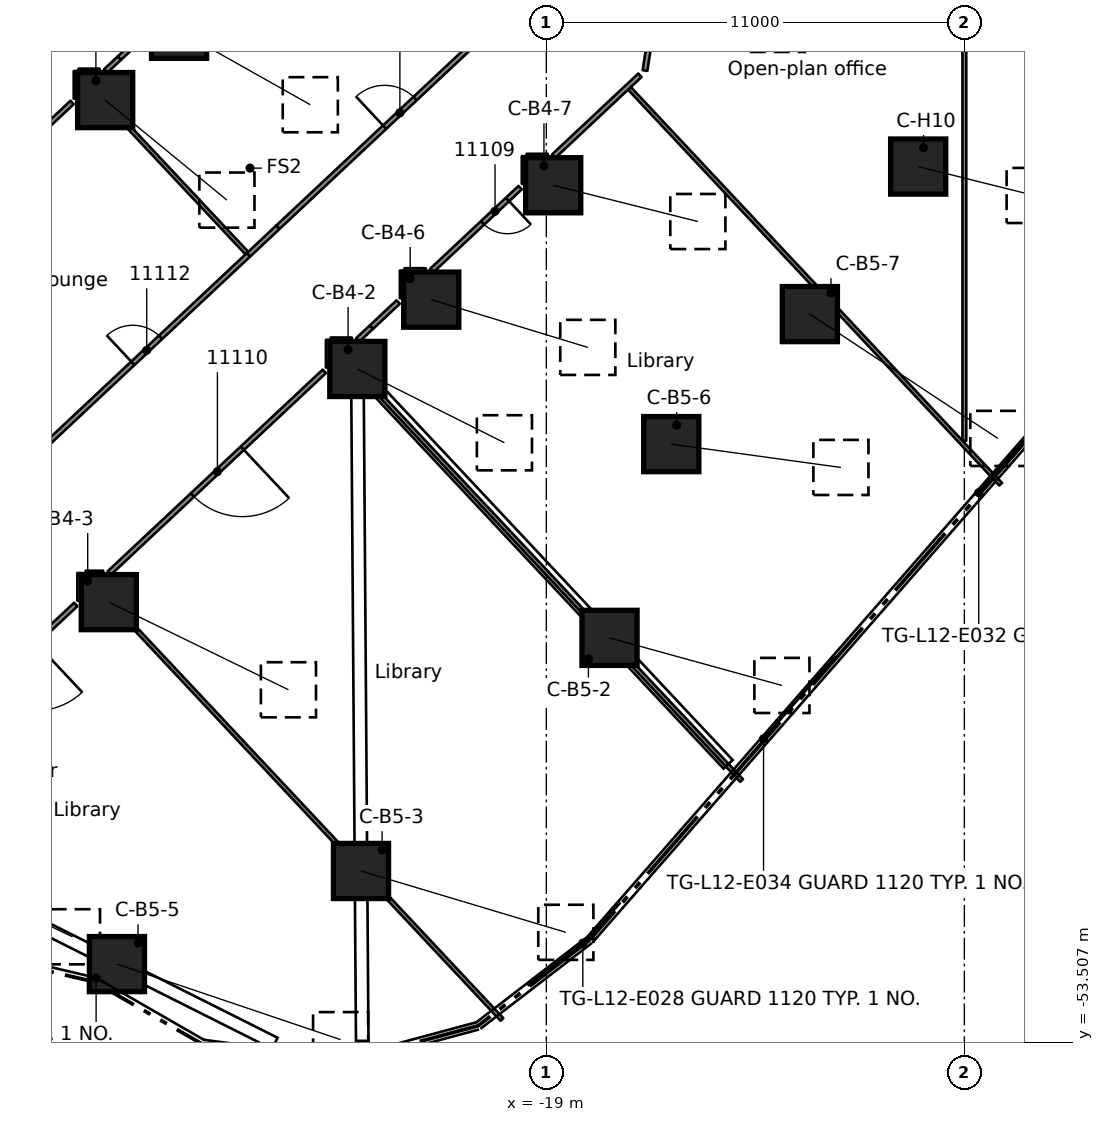
"""IFC4 building model, lengths in metres.
Left out: names, types, materials, properties, quantities, classifications, styles, units other than length and angle.
Written with IfcOpenShell. Run it as: python <this file> out.ifc"""

import sys

from ifc_helpers import new_model, si_unit, direction, frame, frame_2d, origin, origin_2d, place, context, subcontext, project, spatial, rectangle, extrude, element, fill, save


model = new_model("IFC4")
c1 = context("Model", 3, precision=1e-05, world=origin(), true_north=direction((0.0, 1.0)))
c2 = subcontext(c1, "Body", "Model", "MODEL_VIEW")
j1 = project(units=[si_unit("LENGTHUNIT", "METRE"), si_unit("PLANEANGLEUNIT", "RADIAN")], contexts=[c1])
p1 = place(None, origin())
s1 = spatial("IfcSite", under=j1, at=p1, CompositionType="ELEMENT")
p2 = place(p1, origin())
s2 = spatial("IfcBuilding", under=s1, at=p2, CompositionType="ELEMENT")
p3 = place(p2, frame((0.0, 0.0, 54.8)))
s3 = spatial("IfcBuildingStorey", under=s2, at=p3, CompositionType="ELEMENT", Elevation=54.8)
p4 = place(p3, frame((-30.609, -28.71, 0.601), z_axis=(0.640539472129, -0.526030167731, 0.559465322681), x_axis=(0.634647743871, 0.77280155357, 0.0)))
e1 = element("IfcColumn", 1, at=p4, inside=s3, PredefinedType="COLUMN", context=c2, shape_type="SweptSolid", body=[
    extrude(rectangle(XDim=1.45, YDim=1.45, at=origin_2d()), origin(), (0.0, 0.0, 1.0), 5.002),
])
p5 = place(p3, frame((-28.664, -26.886, 0.591), z_axis=(0.710018665714, -0.400138488717, 0.579450329351), x_axis=(0.490962919212, 0.871180470373, 0.0)))
e2 = element("IfcColumn", 2, at=p5, inside=s3, PredefinedType="COLUMN", context=c2, shape_type="SweptSolid", body=[
    extrude(rectangle(XDim=1.45, YDim=1.45, at=origin_2d()), origin(), (0.0, 0.0, 1.0), 4.864),
])
p6 = place(p3, frame((-23.973, -35.785, 0.61), z_axis=(0.752105083645, -0.377452270544, 0.540247838141), x_axis=(0.448543789872, 0.893760856475, 0.0)))
e3 = element("IfcColumn", 3, at=p6, inside=s3, PredefinedType="COLUMN", context=c2, shape_type="SweptSolid", body=[
    extrude(rectangle(XDim=1.45, YDim=1.45, at=origin_2d()), origin(), (0.0, 0.0, 1.0), 5.146),
])
p7 = place(p3, frame((-30.513, -41.92, 0.644), z_axis=(0.798859330442, -0.389733768999, 0.458182670414), x_axis=(0.438465700067, 0.898747923427, 0.0)))
e4 = element("IfcColumn", 4, at=p7, inside=s3, PredefinedType="COLUMN", context=c2, shape_type="SweptSolid", body=[
    extrude(rectangle(XDim=1.45, YDim=1.45, at=origin_2d()), origin(), (0.0, 0.0, 1.0), 5.917),
])
p8 = place(p3, frame((-37.053, -48.054, 0.666), z_axis=(0.828402754462, -0.396272933568, 0.395874523709), x_axis=(0.43152667224, 0.902100177999, 0.0)))
e5 = element("IfcColumn", 5, at=p8, inside=s3, PredefinedType="COLUMN", context=c2, shape_type="SweptSolid", body=[
    extrude(rectangle(XDim=1.45, YDim=1.45, at=origin_2d()), origin(), (0.0, 0.0, 1.0), 6.741),
])
p9 = place(p3, frame((-22.028, -33.961, 0.609), z_axis=(0.803445484043, -0.245005157385, 0.542630470049), x_axis=(0.291682692006, 0.956515136934, 0.0)))
e6 = element("IfcColumn", 6, at=p9, inside=s3, PredefinedType="COLUMN", context=c2, shape_type="SweptSolid", body=[
    extrude(rectangle(XDim=1.45, YDim=1.45, at=origin_2d()), origin(), (0.0, 0.0, 1.0), 5.127),
])
p10 = place(p3, frame((-18.819, -30.951, 0.588), z_axis=(0.787390274069, -0.197377882685, 0.584002164147), x_axis=(0.243150442879, 0.969988588659, 0.0)))
e7 = element("IfcColumn", 7, at=p10, inside=s3, PredefinedType="COLUMN", context=c2, shape_type="SweptSolid", body=[
    extrude(rectangle(XDim=1.45, YDim=1.45, at=origin_2d()), origin(), (0.0, 0.0, 1.0), 4.834),
])
p11 = place(p3, frame((-17.337, -42.86, 0.626), z_axis=(0.83241899927, -0.22975642544, 0.504272341719), x_axis=(0.266062002517, 0.963955917465, 0.0)))
e8 = element("IfcColumn", 8, at=p11, inside=s3, PredefinedType="COLUMN", context=c2, shape_type="SweptSolid", body=[
    extrude(rectangle(XDim=1.45, YDim=1.45, at=origin_2d()), origin(), (0.0, 0.0, 1.0), 5.449),
])
p12 = place(p3, frame((-23.877, -48.994, 0.654), z_axis=(0.864156879043, -0.25877343513, 0.431589153795), x_axis=(0.286866155461, 0.957970672229, 0.0)))
e9 = element("IfcColumn", 9, at=p12, inside=s3, PredefinedType="COLUMN", context=c2, shape_type="SweptSolid", body=[
    extrude(rectangle(XDim=1.45, YDim=1.45, at=origin_2d()), origin(), (0.0, 0.0, 1.0), 6.237),
])
p13 = place(p3, frame((-30.299, -51.444, 0.666), z_axis=(0.870574615383, -0.29400715577, 0.394537237035), x_axis=(0.319962531243, 0.947430197218, 0.0)))
e10 = element("IfcColumn", 10, at=p13, inside=s3, PredefinedType="COLUMN", context=c2, shape_type="SweptSolid", body=[
    extrude(rectangle(XDim=1.45, YDim=1.45, at=origin_2d()), origin(), (0.0, 0.0, 1.0), 6.761),
])
p14 = place(p3, frame((-15.712, -37.762, 0.618), z_axis=(0.844461322834, -0.116157308408, 0.522869538165), x_axis=(0.136268858518, 0.990671892303, 0.0)))
e11 = element("IfcColumn", 11, at=p14, inside=s3, PredefinedType="COLUMN", context=c2, shape_type="SweptSolid", body=[
    extrude(rectangle(XDim=1.45, YDim=1.45, at=origin_2d()), origin(), (0.0, 0.0, 1.0), 5.286),
])
p15 = place(p3, frame((-12.065, -34.341, 0.661), z_axis=(0.7601997226, -0.502647973321, 0.41163259914), x_axis=(0.551542261088, 0.834146950024, 0.0)))
e12 = element("IfcColumn", 12, at=p15, inside=s3, PredefinedType="COLUMN", context=c2, shape_type="SweptSolid", body=[
    extrude(rectangle(XDim=1.45, YDim=1.45, at=origin_2d()), origin(), (0.0, 0.0, 1.0), 6.508),
])
p16 = place(p3, frame((-9.215, -30.459, 0.53), z_axis=(0.708756376313, -0.176721352289, 0.682959707948), x_axis=(0.241932903281, 0.970292981686, 0.0)))
e13 = element("IfcColumn", 13, at=p16, inside=s3, PredefinedType="COLUMN", context=c2, shape_type="SweptSolid", body=[
    extrude(rectangle(XDim=1.45, YDim=1.45, at=origin_2d()), origin(), (0.0, 0.0, 1.0), 4.306),
])
p17 = place(p3, frame((-15.495, -25.313, 0.508), z_axis=(0.61545416164, -0.336025835882, 0.71295358372), x_axis=(0.479207722379, 0.877701520343, 0.0)))
e14 = element("IfcColumn", 14, at=p17, inside=s3, PredefinedType="COLUMN", context=c2, shape_type="SweptSolid", body=[
    extrude(rectangle(XDim=1.45, YDim=1.45, at=origin_2d()), origin(), (0.0, 0.0, 1.0), 4.184),
])
p18 = place(p3, frame((-31.085, -41.261, 0.0), z_axis=(0.0, 0.0, 1.0), x_axis=(0.684092269, -0.729395480857, 0.0)))
e15 = element("IfcWall", 15, at=p18, inside=s3, PredefinedType="PARTITIONING", context=c2, shape_type="SweptSolid", body=[
    extrude(rectangle(XDim=15.957, YDim=0.1, at=frame_2d((7.979, 0.0))), origin(), (0.0, 0.0, 1.0), 3.58),
])
p19 = place(p3, frame((-31.274, -28.052, 0.0), z_axis=(0.0, 0.0, 1.0), x_axis=(0.684140939344, -0.729349830406, 0.0)))
e16 = element("IfcWall", 16, at=p19, inside=s3, PredefinedType="PARTITIONING", context=c2, shape_type="SweptSolid", body=[
    extrude(rectangle(XDim=6.421, YDim=0.1, at=frame_2d((3.21, 0.0))), origin(), (0.0, 0.0, 1.0), 3.58),
])
p20 = place(p3, frame((-24.638, -35.126, 0.0), z_axis=(0.0, 0.0, 1.0), x_axis=(0.684140619999, -0.729350129956, 0.0)))
e17 = element("IfcWall", 17, at=p20, inside=s3, PredefinedType="PARTITIONING", context=c2, shape_type="SweptSolid", body=[
    extrude(rectangle(XDim=15.752, YDim=0.1, at=frame_2d((7.876, 0.0))), origin(), (0.0, 0.0, 1.0), 3.58),
])
p21 = place(p3, frame((-16.813, -28.402, 0.0), z_axis=(0.0, 0.0, 1.0), x_axis=(0.684091249036, -0.729396437469, 0.0)))
e18 = element("IfcWall", 18, at=p21, inside=s3, PredefinedType="PARTITIONING", context=c2, shape_type="SweptSolid", body=[
    extrude(rectangle(XDim=14.28, YDim=0.1, at=frame_2d((7.14, 0.0))), origin(), (0.0, 0.0, 1.0), 3.58),
])
p22 = place(p3, frame((-31.122, -41.155, 0.0), z_axis=(0.0, 0.0, 1.0), x_axis=(1.0, 0.0, 0.0)))
e19 = element("IfcWall", 19, at=p22, inside=s3, PredefinedType="PARTITIONING", context=c2, shape_type="SweptSolid", body=[
    extrude(rectangle(XDim=0.462, YDim=0.125, at=frame_2d((0.231, 0.0))), origin(), (0.0, 0.0, 1.0), 3.58),
])
p23 = place(p3, frame((-24.674, -35.02, 0.0), z_axis=(0.0, 0.0, 1.0), x_axis=(1.0, 0.0, 0.0)))
e20 = element("IfcWall", 20, at=p23, inside=s3, PredefinedType="PARTITIONING", context=c2, shape_type="SweptSolid", body=[
    extrude(rectangle(XDim=0.555, YDim=0.125, at=frame_2d((0.278, 0.0))), origin(), (0.0, 0.0, 1.0), 3.58),
])
p24 = place(p3, frame((-22.73, -33.196, 0.0), z_axis=(0.0, 0.0, 1.0), x_axis=(1.0, 0.0, 0.0)))
e21 = element("IfcWall", 21, at=p24, inside=s3, PredefinedType="PARTITIONING", context=c2, shape_type="SweptSolid", body=[
    extrude(rectangle(XDim=0.556, YDim=0.125, at=frame_2d((0.278, 0.0))), origin(), (0.0, 0.0, 1.0), 3.58),
])
p25 = place(p3, frame((-19.52, -30.186, 0.0), z_axis=(0.0, 0.0, 1.0), x_axis=(1.0, 0.0, 0.0)))
e22 = element("IfcWall", 22, at=p25, inside=s3, PredefinedType="PARTITIONING", context=c2, shape_type="SweptSolid", body=[
    extrude(rectangle(XDim=0.555, YDim=0.125, at=frame_2d((0.277, 0.0))), origin(), (0.0, 0.0, 1.0), 3.58),
])
p26 = place(p3, frame((-31.311, -27.945, 0.0), z_axis=(0.0, 0.0, 1.0), x_axis=(1.0, 0.0, 0.0)))
e23 = element("IfcWall", 23, at=p26, inside=s3, PredefinedType="PARTITIONING", context=c2, shape_type="SweptSolid", body=[
    extrude(rectangle(XDim=0.557, YDim=0.125, at=frame_2d((0.279, 0.0))), origin(), (0.0, 0.0, 1.0), 3.58),
])
p27 = place(p3, frame((-23.961, -35.02, 0.0), z_axis=(0.0, 0.0, 1.0), x_axis=(0.729691146692, 0.683776886447, 0.0)))
e24 = element("IfcWall", 24, at=p27, inside=s3, PredefinedType="PARTITIONING", context=c2, shape_type="SweptSolid", body=[
    extrude(rectangle(XDim=0.495, YDim=0.125, at=frame_2d((0.247, 0.0))), origin(), (0.0, 0.0, 1.0), 3.58),
])
p28 = place(p3, frame((-30.236, -27.607, 0.0), z_axis=(0.0, 0.0, 1.0), x_axis=(0.730201947911, 0.683231377548, 0.0)))
e25 = element("IfcWall", 25, at=p28, inside=s3, PredefinedType="PARTITIONING", context=c2, shape_type="SweptSolid", body=[
    extrude(rectangle(XDim=0.962, YDim=0.125, at=frame_2d((0.481, 0.0))), origin(), (0.0, 0.0, 1.0), 3.58),
])
p29 = place(p3, frame((-31.383, -41.982, 0.0), z_axis=(0.0, 0.0, 1.0), x_axis=(-0.729340966423, -0.684150388947, 0.0)))
e26 = element("IfcWall", 26, at=p29, inside=s3, PredefinedType="PARTITIONING", context=c2, shape_type="SweptSolid", body=[
    extrude(rectangle(XDim=4.889, YDim=0.125, at=frame_2d((2.445, 0.0))), origin(), (0.0, 0.0, 1.0), 3.58),
])
p30 = place(p29, frame((1.456, 0.0, 0.0)))
e27 = element("IfcOpeningElement", 27, at=p30, cuts=e26, PredefinedType="OPENING", context=c2, shape_type="SweptSolid", body=[
    extrude(rectangle(XDim=1.8, YDim=2.1, at=frame_2d((0.9, 1.05))), frame((0.0, 0.073, 0.0), z_axis=(0.0, -1.0, 0.0), x_axis=(1.0, 0.0, 0.0)), (0.0, 0.0, 1.0), 0.145),
])
p31 = place(p3, frame((-24.843, -35.848, 0.0), z_axis=(0.0, 0.0, 1.0), x_axis=(-0.729416485857, -0.684069872279, 0.0)))
e28 = element("IfcWall", 28, at=p31, inside=s3, PredefinedType="PARTITIONING", context=c2, shape_type="SweptSolid", body=[
    extrude(rectangle(XDim=7.758, YDim=0.125, at=frame_2d((3.879, 0.0))), origin(), (0.0, 0.0, 1.0), 3.58),
])
p32 = place(p31, frame((2.956, 0.0, 0.0)))
e29 = element("IfcOpeningElement", 29, at=p32, cuts=e28, PredefinedType="OPENING", context=c2, shape_type="SweptSolid", body=[
    extrude(rectangle(XDim=1.8, YDim=2.1, at=frame_2d((0.9, 1.05))), frame((0.0, 0.073, 0.0), z_axis=(0.0, -1.0, 0.0), x_axis=(1.0, 0.0, 0.0)), (0.0, 0.0, 1.0), 0.145),
])
p33 = place(p3, frame((-23.6, -34.682, 0.0), z_axis=(0.0, 0.0, 1.0), x_axis=(0.729695429222, 0.683772316326, 0.0)))
e30 = element("IfcWall", 30, at=p33, inside=s3, PredefinedType="PARTITIONING", context=c2, shape_type="SweptSolid", body=[
    extrude(rectangle(XDim=0.962, YDim=0.125, at=frame_2d((0.481, 0.0))), origin(), (0.0, 0.0, 1.0), 3.58),
])
p34 = place(p3, frame((-19.689, -31.014, 0.0), z_axis=(0.0, 0.0, 1.0), x_axis=(-0.72947037737, -0.684012403791, 0.0)))
e31 = element("IfcWall", 31, at=p34, inside=s3, PredefinedType="PARTITIONING", context=c2, shape_type="SweptSolid", body=[
    extrude(rectangle(XDim=3.19, YDim=0.125, at=frame_2d((1.595, 0.0))), origin(), (0.0, 0.0, 1.0), 3.58),
])
p35 = place(p34, frame((0.456, 0.0, 0.0)))
e32 = element("IfcOpeningElement", 32, at=p35, cuts=e31, PredefinedType="OPENING", context=c2, shape_type="SweptSolid", body=[
    extrude(rectangle(XDim=0.9, YDim=2.1, at=frame_2d((0.45, 1.05))), frame((0.0, 0.073, 0.0), z_axis=(0.0, -1.0, 0.0), x_axis=(1.0, 0.0, 0.0)), (0.0, 0.0, 1.0), 0.145),
])
p36 = place(p3, frame((-18.807, -30.186, 0.0), z_axis=(0.0, 0.0, 1.0), x_axis=(0.729339012688, 0.684152471728, 0.0)))
e33 = element("IfcWall", 33, at=p36, inside=s3, PredefinedType="PARTITIONING", context=c2, shape_type="SweptSolid", body=[
    extrude(rectangle(XDim=3.112, YDim=0.125, at=frame_2d((1.556, 0.0))), origin(), (0.0, 0.0, 1.0), 3.58),
])
p37 = place(p3, frame((-32.218, -37.828, 0.0), z_axis=(0.0, 0.0, 1.0), x_axis=(0.729395805056, 0.68409192333, 0.0)))
e34 = element("IfcWall", 34, at=p37, inside=s3, PredefinedType="PARTITIONING", context=c2, shape_type="SweptSolid", body=[
    extrude(rectangle(XDim=7.377, YDim=0.125, at=frame_2d((3.689, 0.0))), origin(), (0.0, 0.0, 1.0), 3.58),
])
p38 = place(p37, frame((3.206, 0.0, 0.0)))
e35 = element("IfcOpeningElement", 35, at=p38, cuts=e34, PredefinedType="OPENING", context=c2, shape_type="SweptSolid", body=[
    extrude(rectangle(XDim=1.0, YDim=2.1, at=frame_2d((0.5, 1.05))), frame((0.0, 0.073, 0.0), z_axis=(0.0, -1.0, 0.0), x_axis=(1.0, 0.0, 0.0)), (0.0, 0.0, 1.0), 0.145),
])
p39 = place(p3, frame((-26.063, -32.055, 0.0), z_axis=(0.0, 0.0, 1.0), x_axis=(0.729480399327, 0.684001715639, 0.0)))
e36 = element("IfcWall", 36, at=p39, inside=s3, PredefinedType="PARTITIONING", context=c2, shape_type="SweptSolid", body=[
    extrude(rectangle(XDim=8.444, YDim=0.125, at=frame_2d((4.222, 0.0))), origin(), (0.0, 0.0, 1.0), 3.58),
])
p40 = place(p39, frame((3.85, 0.0, 0.0)))
e37 = element("IfcOpeningElement", 37, at=p40, cuts=e36, PredefinedType="OPENING", context=c2, shape_type="SweptSolid", body=[
    extrude(rectangle(XDim=1.1, YDim=2.1, at=frame_2d((0.55, 1.05))), frame((0.0, 0.073, 0.0), z_axis=(0.0, -1.0, 0.0), x_axis=(1.0, 0.0, 0.0)), (0.0, 0.0, 1.0), 0.145),
])
p41 = place(p3, frame((-26.836, -32.781, 0.0), z_axis=(0.0, 0.0, 1.0), x_axis=(0.728861997168, 0.684660637896, 0.0)))
e38 = element("IfcWall", 38, at=p41, inside=s3, PredefinedType="PARTITIONING", context=c2, shape_type="SweptSolid", body=[
    extrude(rectangle(XDim=1.061, YDim=0.125, at=frame_2d((0.53, 0.0))), origin(), (0.0, 0.0, 1.0), 3.58),
])
p42 = place(p3, frame((-37.138, -34.08, 0.0), z_axis=(0.0, 0.0, 1.0), x_axis=(0.729416485857, 0.684069872279, 0.0)))
e39 = element("IfcWall", 39, at=p42, inside=s3, PredefinedType="PARTITIONING", context=c2, shape_type="SweptSolid", body=[
    extrude(rectangle(XDim=7.758, YDim=0.125, at=frame_2d((3.879, 0.0))), origin(), (0.0, 0.0, 1.0), 3.58),
])
p43 = place(p3, frame((-30.596, -27.945, 0.0), z_axis=(0.0, 0.0, 1.0), x_axis=(0.728765825334, 0.68476300413, 0.0)))
e40 = element("IfcWall", 40, at=p43, inside=s3, PredefinedType="PARTITIONING", context=c2, shape_type="SweptSolid", body=[
    extrude(rectangle(XDim=0.494, YDim=0.125, at=frame_2d((0.247, 0.0))), origin(), (0.0, 0.0, 1.0), 3.58),
])
p44 = place(p3, frame((-39.52, -31.378, 0.0), z_axis=(0.0, 0.0, 1.0), x_axis=(0.729357865, 0.684132373713, 0.0)))
e41 = element("IfcWall", 41, at=p44, inside=s3, PredefinedType="PARTITIONING", context=c2, shape_type="SweptSolid", body=[
    extrude(rectangle(XDim=18.597, YDim=0.125, at=frame_2d((9.299, 0.0))), origin(), (0.0, 0.0, 1.0), 3.58),
])
p45 = place(p44, frame((12.952, 0.0, 0.0)))
e42 = element("IfcOpeningElement", 42, at=p45, cuts=e41, PredefinedType="OPENING", context=c2, shape_type="SweptSolid", body=[
    extrude(rectangle(XDim=1.8, YDim=2.1, at=frame_2d((0.9, 1.05))), frame((0.0, 0.073, 0.0), z_axis=(0.0, -1.0, 0.0), x_axis=(1.0, 0.0, 0.0)), (0.0, 0.0, 1.0), 0.145),
])
p46 = place(p44, frame((3.206, 0.0, 0.0)))
e43 = element("IfcOpeningElement", 43, at=p46, cuts=e41, PredefinedType="OPENING", context=c2, shape_type="SweptSolid", body=[
    extrude(rectangle(XDim=1.8, YDim=2.1, at=frame_2d((0.9, 1.05))), frame((0.0, 0.073, 0.0), z_axis=(0.0, -1.0, 0.0), x_axis=(1.0, 0.0, 0.0)), (0.0, 0.0, 1.0), 0.145),
])
p47 = place(p3, frame((-16.404, -27.932, 0.0), z_axis=(0.0, 0.0, 1.0), x_axis=(0.154065464464, 0.988060642197, 0.0)))
e44 = element("IfcWall", 44, at=p47, inside=s3, PredefinedType="PARTITIONING", context=c2, shape_type="SweptSolid", body=[
    extrude(rectangle(XDim=1.818, YDim=0.125, at=frame_2d((0.909, 0.0))), origin(), (0.0, 0.0, 1.0), 3.58),
])
p48 = place(p3, frame((-8.0, -37.672, 0.0), z_axis=(0.0, 0.0, 1.0), x_axis=(0.0, 1.0, 0.0)))
e45 = element("IfcWall", 45, at=p48, inside=s3, PredefinedType="PARTITIONING", context=c2, shape_type="SweptSolid", body=[
    extrude(rectangle(XDim=22.01, YDim=0.1, at=frame_2d((11.005, 0.0))), origin(), (0.0, 0.0, 1.0), 3.58),
])
for number, where, z_axis, x_axis in (
    (46, (-19.583, -30.914, 0.0), (0.0, 0.0, 1.0), (0.0, 1.0, 0.0)),
    (47, (-22.792, -33.924, 0.0), (0.0, 0.0, 1.0), (0.0, 1.0, 0.0)),
):
    element("IfcWall", number, at=place(p3, frame(where, z_axis=z_axis, x_axis=x_axis)), inside=s3, PredefinedType="PARTITIONING", context=c2, shape_type="SweptSolid", body=[
        extrude(rectangle(XDim=0.728, YDim=0.125, at=frame_2d((0.364, 0.0))), origin(), (0.0, 0.0, 1.0), 3.58),
    ])
p49 = place(p3, frame((-24.737, -35.749, 0.0), z_axis=(0.0, 0.0, 1.0), x_axis=(0.0, 1.0, 0.0)))
e48 = element("IfcWall", 48, at=p49, inside=s3, PredefinedType="PARTITIONING", context=c2, shape_type="SweptSolid", body=[
    extrude(rectangle(XDim=0.729, YDim=0.125, at=frame_2d((0.365, 0.0))), origin(), (0.0, 0.0, 1.0), 3.58),
])
p50 = place(p3, frame((-31.278, -41.883, 0.0), z_axis=(0.0, 0.0, 1.0), x_axis=(0.0, 1.0, 0.0)))
e49 = element("IfcWall", 49, at=p50, inside=s3, PredefinedType="PARTITIONING", context=c2, shape_type="SweptSolid", body=[
    extrude(rectangle(XDim=0.728, YDim=0.125, at=frame_2d((0.364, 0.0))), origin(), (0.0, 0.0, 1.0), 3.58),
])
p51 = place(p3, frame((-31.374, -28.674, 0.0), z_axis=(0.0, 0.0, 1.0), x_axis=(0.0, 1.0, 0.0)))
e50 = element("IfcWall", 50, at=p51, inside=s3, PredefinedType="PARTITIONING", context=c2, shape_type="SweptSolid", body=[
    extrude(rectangle(XDim=0.729, YDim=0.125, at=frame_2d((0.365, 0.0))), origin(), (0.0, 0.0, 1.0), 3.58),
])
p52 = place(p35, origin())
e51 = element("IfcDoor", 51, at=p52, inside=s3, OperationType="SINGLE_SWING_LEFT", PredefinedType="DOOR", context=c2, shape_type="SweptSolid", body=[
    extrude(rectangle(XDim=0.9, YDim=2.1, at=frame_2d((0.45, 1.05))), frame((0.0, 0.025, 0.0), z_axis=(0.0, -1.0, 0.0), x_axis=(1.0, 0.0, 0.0)), (0.0, 0.0, 1.0), 0.05),
])
fill(e32, e51)
p53 = place(p32, origin())
e52 = element("IfcDoor", 52, at=p53, inside=s3, OperationType="DOUBLE_DOOR_SINGLE_SWING", PredefinedType="DOOR", context=c2, shape_type="SweptSolid", body=[
    extrude(rectangle(XDim=1.8, YDim=2.1, at=frame_2d((0.9, 1.05))), frame((0.0, 0.025, 0.0), z_axis=(0.0, -1.0, 0.0), x_axis=(1.0, 0.0, 0.0)), (0.0, 0.0, 1.0), 0.05),
])
fill(e29, e52)
p54 = place(p40, origin())
e53 = element("IfcDoor", 53, at=p54, inside=s3, OperationType="SINGLE_SWING_RIGHT", PredefinedType="DOOR", context=c2, shape_type="SweptSolid", body=[
    extrude(rectangle(XDim=1.1, YDim=2.1, at=frame_2d((0.55, 1.05))), frame((0.0, 0.025, 0.0), z_axis=(0.0, -1.0, 0.0), x_axis=(1.0, 0.0, 0.0)), (0.0, 0.0, 1.0), 0.05),
])
fill(e37, e53)
p55 = place(p38, origin())
e54 = element("IfcDoor", 54, at=p55, inside=s3, OperationType="SINGLE_SWING_RIGHT", PredefinedType="DOOR", context=c2, shape_type="SweptSolid", body=[
    extrude(rectangle(XDim=1.0, YDim=2.1, at=frame_2d((0.5, 1.05))), frame((0.0, 0.025, 0.0), z_axis=(0.0, -1.0, 0.0), x_axis=(1.0, 0.0, 0.0)), (0.0, 0.0, 1.0), 0.05),
])
fill(e35, e54)
save(model, sys.argv[1])
